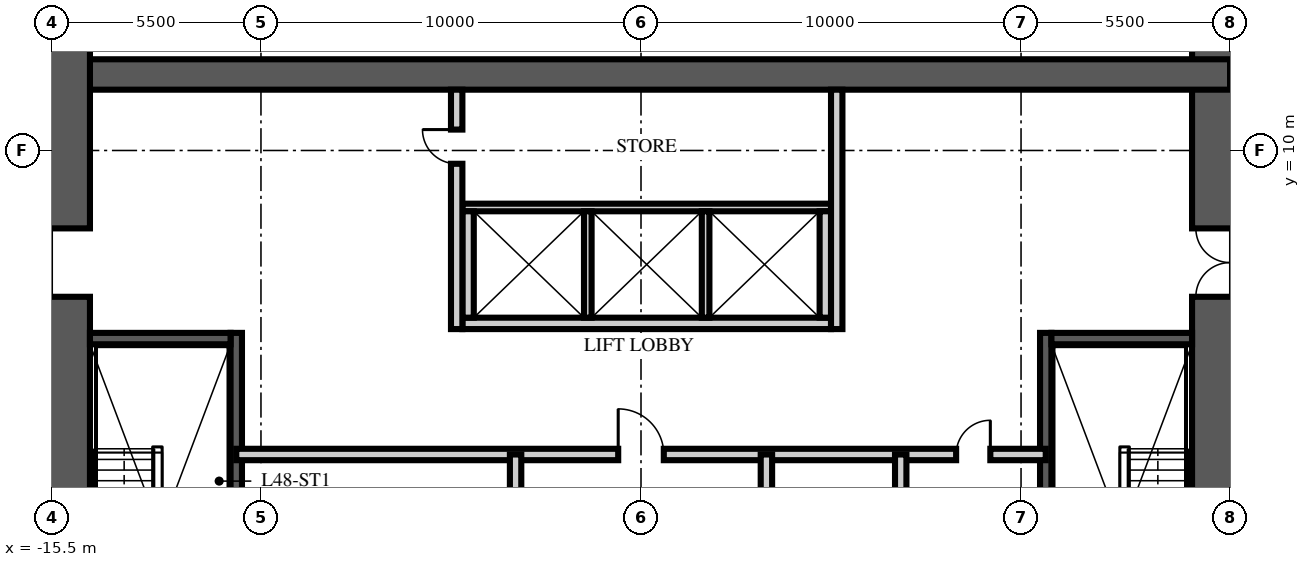
"""IFC4 building model, lengths in metres.
Left out: names, types, materials, properties, quantities, classifications, styles, units other than length and angle.
Written with IfcOpenShell. Run it as: python <this file> out.ifc"""

import sys

from ifc_helpers import new_model, si_unit, direction, frame, frame_2d, origin, place, context, subcontext, project, spatial, rectangle, extrude, element, fill, save


model = new_model("IFC4")
c1 = context("Model", 3, precision=1e-05, world=origin(), true_north=direction((0.0, 1.0)))
c2 = subcontext(c1, "Body", "Model", "MODEL_VIEW")
j1 = project(units=[si_unit("LENGTHUNIT", "METRE"), si_unit("PLANEANGLEUNIT", "RADIAN")], contexts=[c1])
p1 = place(None, origin())
s1 = spatial("IfcSite", under=j1, at=p1, CompositionType="ELEMENT")
p2 = place(p1, origin())
s2 = spatial("IfcBuilding", under=s1, at=p2, CompositionType="ELEMENT")
p3 = place(p2, frame((0.0, 0.0, 192.0)))
s3 = spatial("IfcBuildingStorey", under=s2, at=p3, CompositionType="ELEMENT", Elevation=192.0)
p4 = place(p3, frame((15.5, -15.5, -0.35), z_axis=(0.0, 0.0, 1.0), x_axis=(0.0, 1.0, 0.0)))
e1 = element("IfcWall", 1, at=p4, inside=s3, PredefinedType="SHEAR", context=c2, shape_type="SweptSolid", body=[
    extrude(rectangle(XDim=31.0, YDim=2.0, at=frame_2d((15.5, 0.0))), origin(), (0.0, 0.0, 1.0), 7.6),
])
p5 = place(p4, frame((7.55, 0.0, 0.35)))
e2 = element("IfcOpeningElement", 2, at=p5, cuts=e1, PredefinedType="OPENING", context=c2, shape_type="SweptSolid", body=[
    extrude(rectangle(XDim=1.2, YDim=2.1, at=frame_2d((0.6, 1.05))), frame((0.0, 1.01, 0.0), z_axis=(0.0, -1.0, 0.0), x_axis=(1.0, 0.0, 0.0)), (0.0, 0.0, 1.0), 2.02),
])
p6 = place(p4, frame((21.65, 0.0, 0.35)))
e3 = element("IfcOpeningElement", 3, at=p6, cuts=e1, PredefinedType="OPENING", context=c2, shape_type="SweptSolid", body=[
    extrude(rectangle(XDim=1.8, YDim=2.1, at=frame_2d((0.9, 1.05))), frame((0.0, 1.01, 0.0), z_axis=(0.0, -1.0, 0.0), x_axis=(1.0, 0.0, 0.0)), (0.0, 0.0, 1.0), 2.02),
])
p7 = place(p3, frame((-15.5, 12.0, -0.35), z_axis=(0.0, 0.0, 1.0), x_axis=(1.0, 0.0, 0.0)))
e4 = element("IfcWall", 4, at=p7, inside=s3, PredefinedType="SHEAR", context=c2, shape_type="SweptSolid", body=[
    extrude(rectangle(XDim=31.0, YDim=0.8, at=frame_2d((15.5, 0.0))), origin(), (0.0, 0.0, 1.0), 7.6),
])
p8 = place(p3, frame((-15.5, -15.5, -0.35), z_axis=(0.0, 0.0, 1.0), x_axis=(0.0, 1.0, 0.0)))
e5 = element("IfcWall", 5, at=p8, inside=s3, PredefinedType="SHEAR", context=c2, shape_type="SweptSolid", body=[
    extrude(rectangle(XDim=31.0, YDim=2.0, at=frame_2d((15.5, 0.0))), origin(), (0.0, 0.0, 1.0), 7.6),
])
p9 = place(p8, frame((7.55, 0.0, 0.35)))
e6 = element("IfcOpeningElement", 6, at=p9, cuts=e5, PredefinedType="OPENING", context=c2, shape_type="SweptSolid", body=[
    extrude(rectangle(XDim=1.2, YDim=2.1, at=frame_2d((0.6, 1.05))), frame((0.0, 1.01, 0.0), z_axis=(0.0, -1.0, 0.0), x_axis=(1.0, 0.0, 0.0)), (0.0, 0.0, 1.0), 2.02),
])
p10 = place(p8, frame((21.65, 0.0, 0.35)))
e7 = element("IfcOpeningElement", 7, at=p10, cuts=e5, PredefinedType="OPENING", context=c2, shape_type="SweptSolid", body=[
    extrude(rectangle(XDim=1.8, YDim=2.1, at=frame_2d((0.9, 1.05))), frame((0.0, 1.01, 0.0), z_axis=(0.0, -1.0, 0.0), x_axis=(1.0, 0.0, 0.0)), (0.0, 0.0, 1.0), 2.02),
])
p11 = place(p3, frame((-10.65, -4.9, 0.0), z_axis=(0.0, 0.0, 1.0), x_axis=(0.0, 1.0, 0.0)))
e8 = element("IfcWall", 8, at=p11, inside=s3, PredefinedType="SOLIDWALL", context=c2, shape_type="SweptSolid", body=[
    extrude(rectangle(XDim=10.1, YDim=0.3, at=frame_2d((5.05, 0.0))), origin(), (0.0, 0.0, 1.0), 7.25),
])
p12 = place(p3, frame((-14.5, 5.05, 0.0), z_axis=(0.0, 0.0, 1.0), x_axis=(1.0, 0.0, 0.0)))
e9 = element("IfcWall", 9, at=p12, inside=s3, PredefinedType="SOLIDWALL", context=c2, shape_type="SweptSolid", body=[
    extrude(rectangle(XDim=3.7, YDim=0.3, at=frame_2d((1.85, 0.0))), origin(), (0.0, 0.0, 1.0), 7.25),
])
p13 = place(p3, frame((10.65, -4.9, 0.0), z_axis=(0.0, 0.0, 1.0), x_axis=(0.0, 1.0, 0.0)))
e10 = element("IfcWall", 10, at=p13, inside=s3, PredefinedType="SOLIDWALL", context=c2, shape_type="SweptSolid", body=[
    extrude(rectangle(XDim=10.1, YDim=0.3, at=frame_2d((5.05, 0.0))), origin(), (0.0, 0.0, 1.0), 7.25),
])
p14 = place(p3, frame((14.5, 5.05, 0.0), z_axis=(0.0, 0.0, 1.0), x_axis=(-1.0, 0.0, 0.0)))
e11 = element("IfcWall", 11, at=p14, inside=s3, PredefinedType="SOLIDWALL", context=c2, shape_type="SweptSolid", body=[
    extrude(rectangle(XDim=3.7, YDim=0.3, at=frame_2d((1.85, 0.0))), origin(), (0.0, 0.0, 1.0), 7.25),
])
p15 = place(p3, frame((-4.7, 5.45, 0.0), z_axis=(0.0, 0.0, 1.0), x_axis=(1.0, 0.0, 0.0)))
e12 = element("IfcWall", 12, at=p15, inside=s3, PredefinedType="PARTITIONING", context=c2, shape_type="SweptSolid", body=[
    extrude(rectangle(XDim=9.7, YDim=0.3, at=frame_2d((4.85, 0.0))), origin(), (0.0, 0.0, 1.0), 7.25),
])
p16 = place(p3, frame((-4.7, 8.5, 0.0), z_axis=(0.0, 0.0, 1.0), x_axis=(1.0, 0.0, 0.0)))
e13 = element("IfcWall", 13, at=p16, inside=s3, PredefinedType="PARTITIONING", context=c2, shape_type="SweptSolid", body=[
    extrude(rectangle(XDim=9.7, YDim=0.2, at=frame_2d((4.85, 0.0))), origin(), (0.0, 0.0, 1.0), 7.25),
])
for number, where, z_axis, x_axis in (
    (14, (-4.55, 5.6, 0.0), (0.0, 0.0, 1.0), (0.0, 1.0, 0.0)),
    (15, (4.85, 5.6, 0.0), (0.0, 0.0, 1.0), (0.0, 1.0, 0.0)),
):
    element("IfcWall", number, at=place(p3, frame(where, z_axis=z_axis, x_axis=x_axis)), inside=s3, PredefinedType="PARTITIONING", context=c2, shape_type="SweptSolid", body=[
        extrude(rectangle(XDim=2.8, YDim=0.3, at=frame_2d((1.4, 0.0))), origin(), (0.0, 0.0, 1.0), 7.25),
    ])
for number, where, z_axis, x_axis in (
    (16, (-1.4, 5.6, 0.0), (0.0, 0.0, 1.0), (0.0, 1.0, 0.0)),
    (17, (1.7, 5.6, 0.0), (0.0, 0.0, 1.0), (0.0, 1.0, 0.0)),
):
    element("IfcWall", number, at=place(p3, frame(where, z_axis=z_axis, x_axis=x_axis)), inside=s3, PredefinedType="PARTITIONING", context=c2, shape_type="SweptSolid", body=[
        extrude(rectangle(XDim=2.8, YDim=0.2, at=frame_2d((1.4, 0.0))), origin(), (0.0, 0.0, 1.0), 7.25),
    ])
p17 = place(p3, frame((-10.65, 2.0, 0.0), z_axis=(0.0, 0.0, 1.0), x_axis=(1.0, 0.0, 0.0)))
e18 = element("IfcWall", 18, at=p17, inside=s3, PredefinedType="PARTITIONING", context=c2, shape_type="SweptSolid", body=[
    extrude(rectangle(XDim=21.3, YDim=0.3, at=frame_2d((10.65, 0.0))), origin(), (0.0, 0.0, 1.0), 7.25),
])
p18 = place(p17, frame((10.05, 0.0, 0.0)))
e19 = element("IfcOpeningElement", 19, at=p18, cuts=e18, PredefinedType="OPENING", context=c2, shape_type="SweptSolid", body=[
    extrude(rectangle(XDim=1.2, YDim=2.1, at=frame_2d((0.6, 1.05))), frame((0.0, 0.16, 0.0), z_axis=(0.0, -1.0, 0.0), x_axis=(1.0, 0.0, 0.0)), (0.0, 0.0, 1.0), 0.32),
])
p19 = place(p17, frame((18.942, 0.0, 0.0)))
e20 = element("IfcOpeningElement", 20, at=p19, cuts=e18, PredefinedType="OPENING", context=c2, shape_type="SweptSolid", body=[
    extrude(rectangle(XDim=0.9, YDim=2.1, at=frame_2d((0.45, 1.05))), frame((0.0, 0.16, 0.0), z_axis=(0.0, -1.0, 0.0), x_axis=(1.0, 0.0, 0.0)), (0.0, 0.0, 1.0), 0.32),
])
p20 = place(p3, frame((-3.3, -6.65, 0.0), z_axis=(0.0, 0.0, 1.0), x_axis=(0.0, 1.0, 0.0)))
e21 = element("IfcWall", 21, at=p20, inside=s3, PredefinedType="PARTITIONING", context=c2, shape_type="SweptSolid", body=[
    extrude(rectangle(XDim=8.65, YDim=0.3, at=frame_2d((4.325, 0.0))), origin(), (0.0, 0.0, 1.0), 7.25),
])
p21 = place(p20, frame((1.75, 0.0, 0.0)))
e22 = element("IfcOpeningElement", 22, at=p21, cuts=e21, PredefinedType="OPENING", context=c2, shape_type="SweptSolid", body=[
    extrude(rectangle(XDim=0.9, YDim=2.1, at=frame_2d((0.45, 1.05))), frame((0.0, 0.16, 0.0), z_axis=(0.0, -1.0, 0.0), x_axis=(1.0, 0.0, 0.0)), (0.0, 0.0, 1.0), 0.32),
])
p22 = place(p20, frame((6.075, 0.0, 0.0)))
e23 = element("IfcOpeningElement", 23, at=p22, cuts=e21, PredefinedType="OPENING", context=c2, shape_type="SweptSolid", body=[
    extrude(rectangle(XDim=0.9, YDim=2.1, at=frame_2d((0.45, 1.05))), frame((0.0, 0.16, 0.0), z_axis=(0.0, -1.0, 0.0), x_axis=(1.0, 0.0, 0.0)), (0.0, 0.0, 1.0), 0.32),
])
p23 = place(p3, frame((3.3, -6.65, 0.0), z_axis=(0.0, 0.0, 1.0), x_axis=(0.0, 1.0, 0.0)))
e24 = element("IfcWall", 24, at=p23, inside=s3, PredefinedType="PARTITIONING", context=c2, shape_type="SweptSolid", body=[
    extrude(rectangle(XDim=8.65, YDim=0.3, at=frame_2d((4.325, 0.0))), origin(), (0.0, 0.0, 1.0), 7.25),
])
p24 = place(p23, frame((3.875, 0.0, 0.0)))
e25 = element("IfcOpeningElement", 25, at=p24, cuts=e24, PredefinedType="OPENING", context=c2, shape_type="SweptSolid", body=[
    extrude(rectangle(XDim=0.9, YDim=2.1, at=frame_2d((0.45, 1.05))), frame((0.0, 0.16, 0.0), z_axis=(0.0, -1.0, 0.0), x_axis=(1.0, 0.0, 0.0)), (0.0, 0.0, 1.0), 0.32),
])
p25 = place(p3, frame((6.834, -6.65, 0.0), z_axis=(0.0, 0.0, 1.0), x_axis=(0.0, 1.0, 0.0)))
e26 = element("IfcWall", 26, at=p25, inside=s3, PredefinedType="PARTITIONING", context=c2, shape_type="SweptSolid", body=[
    extrude(rectangle(XDim=8.65, YDim=0.3, at=frame_2d((4.325, 0.0))), origin(), (0.0, 0.0, 1.0), 7.25),
])
p26 = place(p3, frame((-4.85, 5.3, 0.0), z_axis=(0.0, 0.0, 1.0), x_axis=(0.0, 1.0, 0.0)))
e27 = element("IfcWall", 27, at=p26, inside=s3, PredefinedType="PARTITIONING", context=c2, shape_type="SweptSolid", body=[
    extrude(rectangle(XDim=6.3, YDim=0.3, at=frame_2d((3.15, 0.0))), origin(), (0.0, 0.0, 1.0), 7.25),
])
p27 = place(p26, frame((4.35, 0.0, 0.0)))
e28 = element("IfcOpeningElement", 28, at=p27, cuts=e27, PredefinedType="OPENING", context=c2, shape_type="SweptSolid", body=[
    extrude(rectangle(XDim=0.9, YDim=2.1, at=frame_2d((0.45, 1.05))), frame((0.0, 0.16, 0.0), z_axis=(0.0, -1.0, 0.0), x_axis=(1.0, 0.0, 0.0)), (0.0, 0.0, 1.0), 0.32),
])
p28 = place(p3, frame((5.15, 5.3, 0.0), z_axis=(0.0, 0.0, 1.0), x_axis=(0.0, 1.0, 0.0)))
e29 = element("IfcWall", 29, at=p28, inside=s3, PredefinedType="PARTITIONING", context=c2, shape_type="SweptSolid", body=[
    extrude(rectangle(XDim=6.3, YDim=0.3, at=frame_2d((3.15, 0.0))), origin(), (0.0, 0.0, 1.0), 7.25),
])
p29 = place(p10, origin())
e30 = element("IfcDoor", 30, at=p29, inside=s3, OperationType="DOUBLE_DOOR_SINGLE_SWING", PredefinedType="DOOR", context=c2, shape_type="SweptSolid", body=[
    extrude(rectangle(XDim=1.8, YDim=2.1, at=frame_2d((0.9, 1.05))), frame((0.0, 0.025, 0.0), z_axis=(0.0, -1.0, 0.0), x_axis=(1.0, 0.0, 0.0)), (0.0, 0.0, 1.0), 0.05),
])
fill(e7, e30)
p30 = place(p6, origin())
e31 = element("IfcDoor", 31, at=p30, inside=s3, OperationType="DOUBLE_DOOR_SINGLE_SWING", PredefinedType="DOOR", context=c2, shape_type="SweptSolid", body=[
    extrude(rectangle(XDim=1.8, YDim=2.1, at=frame_2d((0.9, 1.05))), frame((0.0, 0.025, 0.0), z_axis=(0.0, -1.0, 0.0), x_axis=(1.0, 0.0, 0.0)), (0.0, 0.0, 1.0), 0.05),
])
fill(e3, e31)
p31 = place(p18, origin())
e32 = element("IfcDoor", 32, at=p31, inside=s3, OperationType="SINGLE_SWING_LEFT", PredefinedType="DOOR", context=c2, shape_type="SweptSolid", body=[
    extrude(rectangle(XDim=1.2, YDim=2.1, at=frame_2d((0.6, 1.05))), frame((0.0, 0.025, 0.0), z_axis=(0.0, -1.0, 0.0), x_axis=(1.0, 0.0, 0.0)), (0.0, 0.0, 1.0), 0.05),
])
fill(e19, e32)
p32 = place(p19, origin())
e33 = element("IfcDoor", 33, at=p32, inside=s3, OperationType="SINGLE_SWING_RIGHT", PredefinedType="DOOR", context=c2, shape_type="SweptSolid", body=[
    extrude(rectangle(XDim=0.9, YDim=2.1, at=frame_2d((0.45, 1.05))), frame((0.0, 0.025, 0.0), z_axis=(0.0, -1.0, 0.0), x_axis=(1.0, 0.0, 0.0)), (0.0, 0.0, 1.0), 0.05),
])
fill(e20, e33)
p33 = place(p27, origin())
e34 = element("IfcDoor", 34, at=p33, inside=s3, OperationType="SINGLE_SWING_RIGHT", PredefinedType="DOOR", context=c2, shape_type="SweptSolid", body=[
    extrude(rectangle(XDim=0.9, YDim=2.1, at=frame_2d((0.45, 1.05))), frame((0.0, 0.025, 0.0), z_axis=(0.0, -1.0, 0.0), x_axis=(1.0, 0.0, 0.0)), (0.0, 0.0, 1.0), 0.05),
])
fill(e28, e34)
save(model, sys.argv[1])
